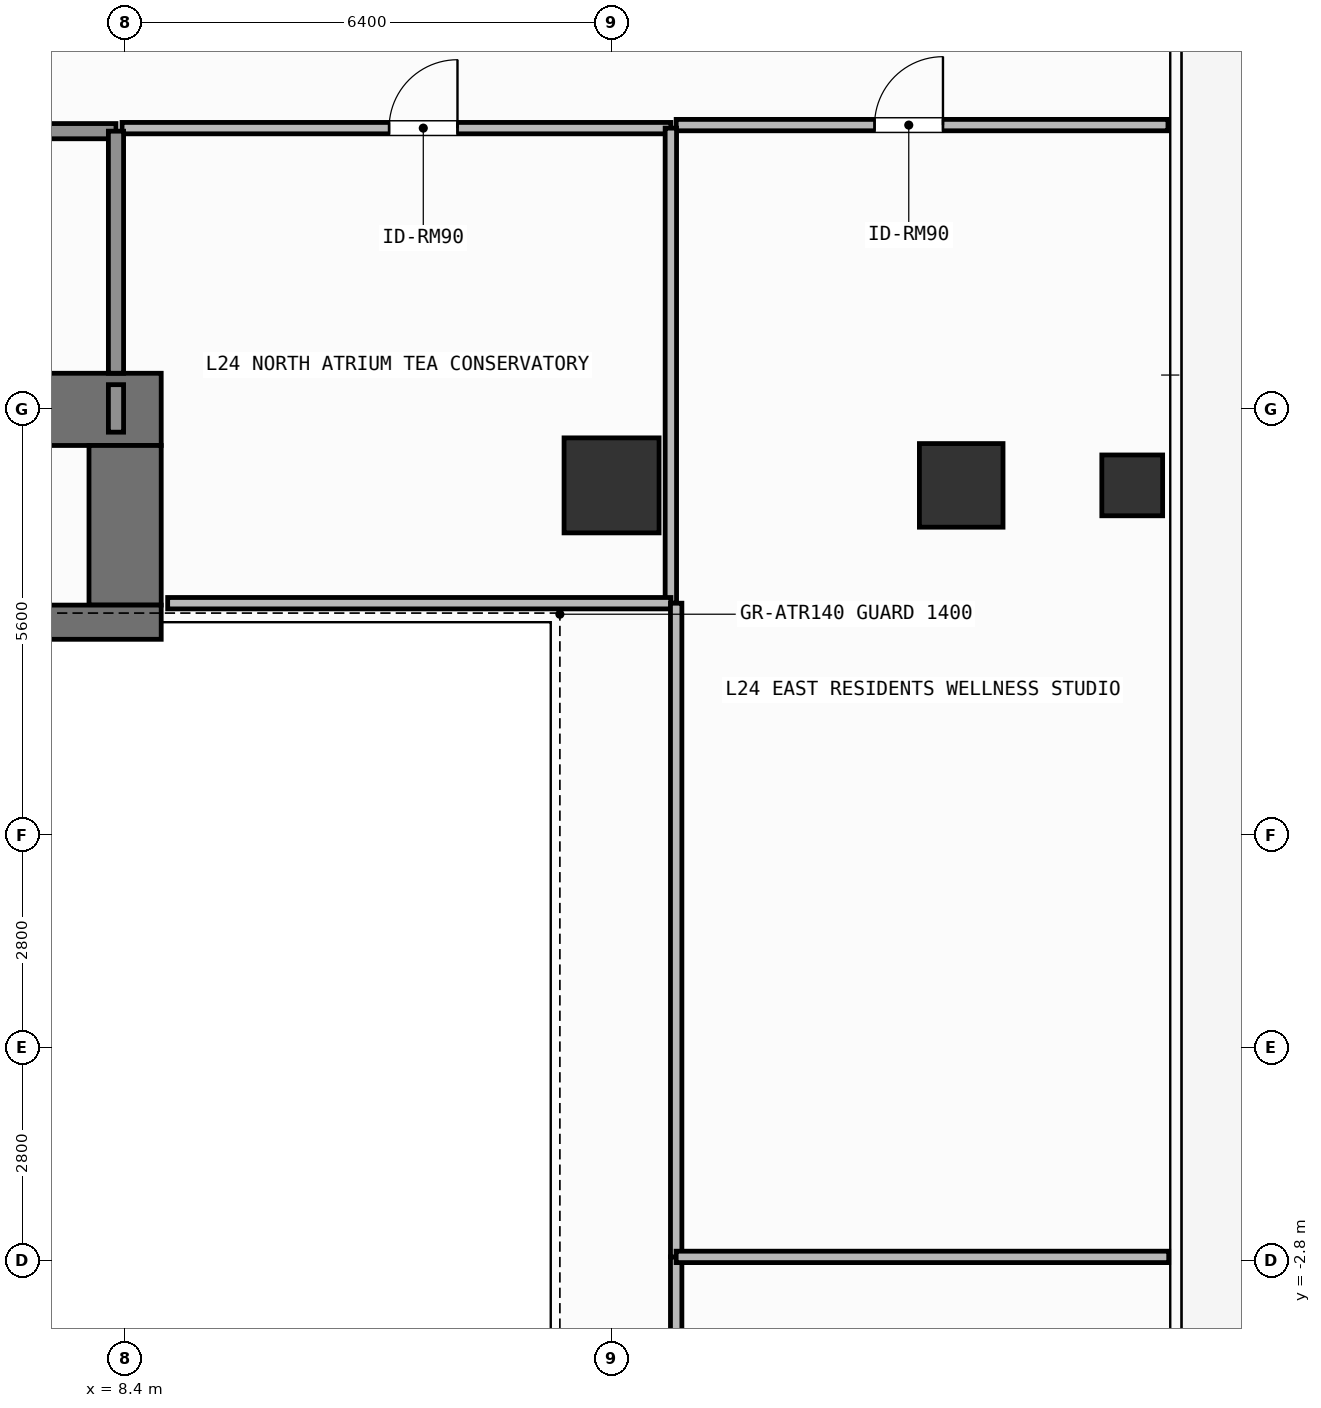
"""IFC4 building model, lengths in metres.
Left out: names, types, materials, properties, quantities, classifications, styles, units other than length and angle.
Written with IfcOpenShell. Run it as: python <this file> out.ifc"""

import sys

from ifc_helpers import new_model, si_unit, direction, frame, frame_2d, origin, origin_2d, place, context, subcontext, project, spatial, rectangle, hollow_rectangle, extrude, element, fill, save


model = new_model("IFC4")
c1 = context("Model", 3, precision=1e-05, world=origin(), true_north=direction((0.0, 1.0)))
c2 = subcontext(c1, "Body", "Model", "MODEL_VIEW")
j1 = project(units=[si_unit("LENGTHUNIT", "METRE"), si_unit("PLANEANGLEUNIT", "RADIAN")], contexts=[c1])
p1 = place(None, origin())
s1 = spatial("IfcSite", under=j1, at=p1, CompositionType="ELEMENT")
p2 = place(p1, origin())
s2 = spatial("IfcBuilding", under=s1, at=p2, CompositionType="ELEMENT")
p3 = place(p2, frame((0.0, 0.0, 96.9)))
s3 = spatial("IfcBuildingStorey", under=s2, at=p3, CompositionType="ELEMENT", Elevation=96.9)
p4 = place(p3, frame((-7.55, 8.4, 0.0), z_axis=(0.0, 0.0, 1.0), x_axis=(1.0, 0.0, 0.0)))
e1 = element("IfcWall", 1, at=p4, inside=s3, PredefinedType="SHEAR", context=c2, shape_type="SweptSolid", body=[
    extrude(rectangle(XDim=16.425, YDim=0.95, at=frame_2d((8.212, 0.0))), origin(), (0.0, 0.0, 1.0), 3.9),
])
p5 = place(p3, frame((8.4, 5.825, 0.0), z_axis=(0.0, 0.0, 1.0), x_axis=(0.0, 1.0, 0.0)))
e2 = element("IfcWall", 2, at=p5, inside=s3, PredefinedType="SHEAR", context=c2, shape_type="SweptSolid", body=[
    extrude(rectangle(XDim=2.1, YDim=0.95, at=frame_2d((1.05, 0.0))), origin(), (0.0, 0.0, 1.0), 3.9),
])
p6 = place(p3, frame((3.045, 5.6, 0.0), z_axis=(0.0, 0.0, 1.0), x_axis=(1.0, 0.0, 0.0)))
e3 = element("IfcWall", 3, at=p6, inside=s3, PredefinedType="SHEAR", context=c2, shape_type="SweptSolid", body=[
    extrude(rectangle(XDim=5.83, YDim=0.45, at=frame_2d((2.915, 0.0))), origin(), (0.0, 0.0, 1.0), 3.9),
])
p7 = place(p3, frame((14.8, 7.4, 0.0), z_axis=(0.0, 0.0, 1.0), x_axis=(1.0, 0.0, 0.0)))
e4 = element("IfcColumn", 4, at=p7, inside=s3, PredefinedType="COLUMN", context=c2, shape_type="SweptSolid", body=[
    extrude(rectangle(XDim=1.25, YDim=1.25, at=origin_2d()), origin(), (0.0, 0.0, 1.0), 3.9),
])
p8 = place(p3, frame((19.4, 7.4, 0.0), z_axis=(0.0, 0.0, 1.0), x_axis=(1.0, 0.0, 0.0)))
e5 = element("IfcColumn", 5, at=p8, inside=s3, PredefinedType="COLUMN", context=c2, shape_type="SweptSolid", body=[
    extrude(rectangle(XDim=1.1, YDim=1.1, at=origin_2d()), origin(), (0.0, 0.0, 1.0), 3.9),
])
p9 = place(p3, frame((21.65, 7.4, 0.0), z_axis=(0.0, 0.0, 1.0), x_axis=(1.0, 0.0, 0.0)))
e6 = element("IfcColumn", 6, at=p9, inside=s3, PredefinedType="COLUMN", context=c2, shape_type="SweptSolid", body=[
    extrude(hollow_rectangle(XDim=0.8, YDim=0.8, WallThickness=0.036, at=origin_2d()), origin(), (0.0, 0.0, 1.0), 3.9),
])
p10 = place(p3, frame((4.58, 12.06, 0.0), z_axis=(0.0, 0.0, 1.0), x_axis=(1.0, 0.0, 0.0)))
e7 = element("IfcWall", 7, at=p10, inside=s3, PredefinedType="SOLIDWALL", context=c2, shape_type="SweptSolid", body=[
    extrude(rectangle(XDim=3.7, YDim=0.2, at=frame_2d((1.85, 0.0))), origin(), (0.0, 0.0, 1.0), 3.68),
])
p11 = place(p10, frame((1.212, 0.0, 0.0)))
e8 = element("IfcOpeningElement", 8, at=p11, cuts=e7, PredefinedType="OPENING", context=c2, shape_type="SweptSolid", body=[
    extrude(rectangle(XDim=1.1, YDim=2.15, at=frame_2d((0.55, 1.075))), frame((0.0, 0.11, 0.0), z_axis=(0.0, -1.0, 0.0), x_axis=(1.0, 0.0, 0.0)), (0.0, 0.0, 1.0), 0.22),
])
p12 = place(p3, frame((8.36, 12.1, 0.0), z_axis=(0.0, 0.0, 1.0), x_axis=(1.0, 0.0, 0.0)))
e9 = element("IfcWall", 9, at=p12, inside=s3, PredefinedType="PARTITIONING", context=c2, shape_type="SweptSolid", body=[
    extrude(rectangle(XDim=7.22, YDim=0.15, at=frame_2d((3.61, 0.0))), origin(), (0.0, 0.0, 1.0), 3.68),
])
p13 = place(p12, frame((3.513, 0.0, 0.0)))
e10 = element("IfcOpeningElement", 10, at=p13, cuts=e9, PredefinedType="OPENING", context=c2, shape_type="SweptSolid", body=[
    extrude(rectangle(XDim=0.9, YDim=2.1, at=frame_2d((0.45, 1.05))), frame((0.0, 0.085, 0.0), z_axis=(0.0, -1.0, 0.0), x_axis=(1.0, 0.0, 0.0)), (0.0, 0.0, 1.0), 0.17),
])
p14 = place(p3, frame((15.65, 12.14, 0.0), z_axis=(0.0, 0.0, 1.0), x_axis=(1.0, 0.0, 0.0)))
e11 = element("IfcWall", 11, at=p14, inside=s3, PredefinedType="PARTITIONING", context=c2, shape_type="SweptSolid", body=[
    extrude(rectangle(XDim=6.47, YDim=0.15, at=frame_2d((3.235, 0.0))), origin(), (0.0, 0.0, 1.0), 3.68),
])
p15 = place(p14, frame((2.61, 0.0, 0.0)))
e12 = element("IfcOpeningElement", 12, at=p15, cuts=e11, PredefinedType="OPENING", context=c2, shape_type="SweptSolid", body=[
    extrude(rectangle(XDim=0.9, YDim=2.1, at=frame_2d((0.45, 1.05))), frame((0.0, 0.085, 0.0), z_axis=(0.0, -1.0, 0.0), x_axis=(1.0, 0.0, 0.0)), (0.0, 0.0, 1.0), 0.17),
])
p16 = place(p3, frame((8.28, 8.875, 0.0), z_axis=(0.0, 0.0, 1.0), x_axis=(0.0, 1.0, 0.0)))
e13 = element("IfcWall", 13, at=p16, inside=s3, PredefinedType="SOLIDWALL", context=c2, shape_type="SweptSolid", body=[
    extrude(rectangle(XDim=3.185, YDim=0.2, at=frame_2d((1.593, 0.0))), origin(), (0.0, 0.0, 1.0), 3.68),
])
p17 = place(p3, frame((8.28, 8.1, 0.0), z_axis=(0.0, 0.0, 1.0), x_axis=(0.0, 1.0, 0.0)))
e14 = element("IfcWall", 14, at=p17, inside=s3, PredefinedType="SOLIDWALL", context=c2, shape_type="SweptSolid", body=[
    extrude(rectangle(XDim=0.625, YDim=0.2, at=frame_2d((0.312, 0.0))), origin(), (0.0, 0.0, 1.0), 3.68),
])
p18 = place(p3, frame((15.58, 5.85, 0.0), z_axis=(0.0, 0.0, 1.0), x_axis=(0.0, 1.0, 0.0)))
e15 = element("IfcWall", 15, at=p18, inside=s3, PredefinedType="PARTITIONING", context=c2, shape_type="SweptSolid", body=[
    extrude(rectangle(XDim=6.25, YDim=0.15, at=frame_2d((3.125, 0.0))), origin(), (0.0, 0.0, 1.0), 3.68),
])
p19 = place(p3, frame((8.96, 5.85, 0.0), z_axis=(0.0, 0.0, 1.0), x_axis=(1.0, 0.0, 0.0)))
e16 = element("IfcWall", 16, at=p19, inside=s3, PredefinedType="PARTITIONING", context=c2, shape_type="SweptSolid", body=[
    extrude(rectangle(XDim=6.62, YDim=0.15, at=frame_2d((3.31, 0.0))), origin(), (0.0, 0.0, 1.0), 3.68),
])
p20 = place(p3, frame((15.65, -5.85, 0.0), z_axis=(0.0, 0.0, 1.0), x_axis=(0.0, 1.0, 0.0)))
e17 = element("IfcWall", 17, at=p20, inside=s3, PredefinedType="PARTITIONING", context=c2, shape_type="SweptSolid", body=[
    extrude(rectangle(XDim=3.1, YDim=0.15, at=frame_2d((1.55, 0.0))), origin(), (0.0, 0.0, 1.0), 3.68),
])
p21 = place(p3, frame((15.65, -2.75, 0.0), z_axis=(0.0, 0.0, 1.0), x_axis=(0.0, 1.0, 0.0)))
e18 = element("IfcWall", 18, at=p21, inside=s3, PredefinedType="PARTITIONING", context=c2, shape_type="SweptSolid", body=[
    extrude(rectangle(XDim=8.6, YDim=0.15, at=frame_2d((4.3, 0.0))), origin(), (0.0, 0.0, 1.0), 3.68),
])
p22 = place(p3, frame((15.65, -2.75, 0.0), z_axis=(0.0, 0.0, 1.0), x_axis=(1.0, 0.0, 0.0)))
e19 = element("IfcWall", 19, at=p22, inside=s3, PredefinedType="PARTITIONING", context=c2, shape_type="SweptSolid", body=[
    extrude(rectangle(XDim=6.48, YDim=0.15, at=frame_2d((3.24, 0.0))), origin(), (0.0, 0.0, 1.0), 3.68),
])
p23 = place(p13, origin())
e20 = element("IfcDoor", 20, at=p23, inside=s3, OperationType="SINGLE_SWING_RIGHT", PredefinedType="DOOR", context=c2, shape_type="SweptSolid", body=[
    extrude(rectangle(XDim=0.9, YDim=2.1, at=frame_2d((0.45, 1.05))), frame((0.0, 0.025, 0.0), z_axis=(0.0, -1.0, 0.0), x_axis=(1.0, 0.0, 0.0)), (0.0, 0.0, 1.0), 0.05),
])
fill(e10, e20)
p24 = place(p15, origin())
e21 = element("IfcDoor", 21, at=p24, inside=s3, OperationType="SINGLE_SWING_RIGHT", PredefinedType="DOOR", context=c2, shape_type="SweptSolid", body=[
    extrude(rectangle(XDim=0.9, YDim=2.1, at=frame_2d((0.45, 1.05))), frame((0.0, 0.025, 0.0), z_axis=(0.0, -1.0, 0.0), x_axis=(1.0, 0.0, 0.0)), (0.0, 0.0, 1.0), 0.05),
])
fill(e12, e21)
save(model, sys.argv[1])
